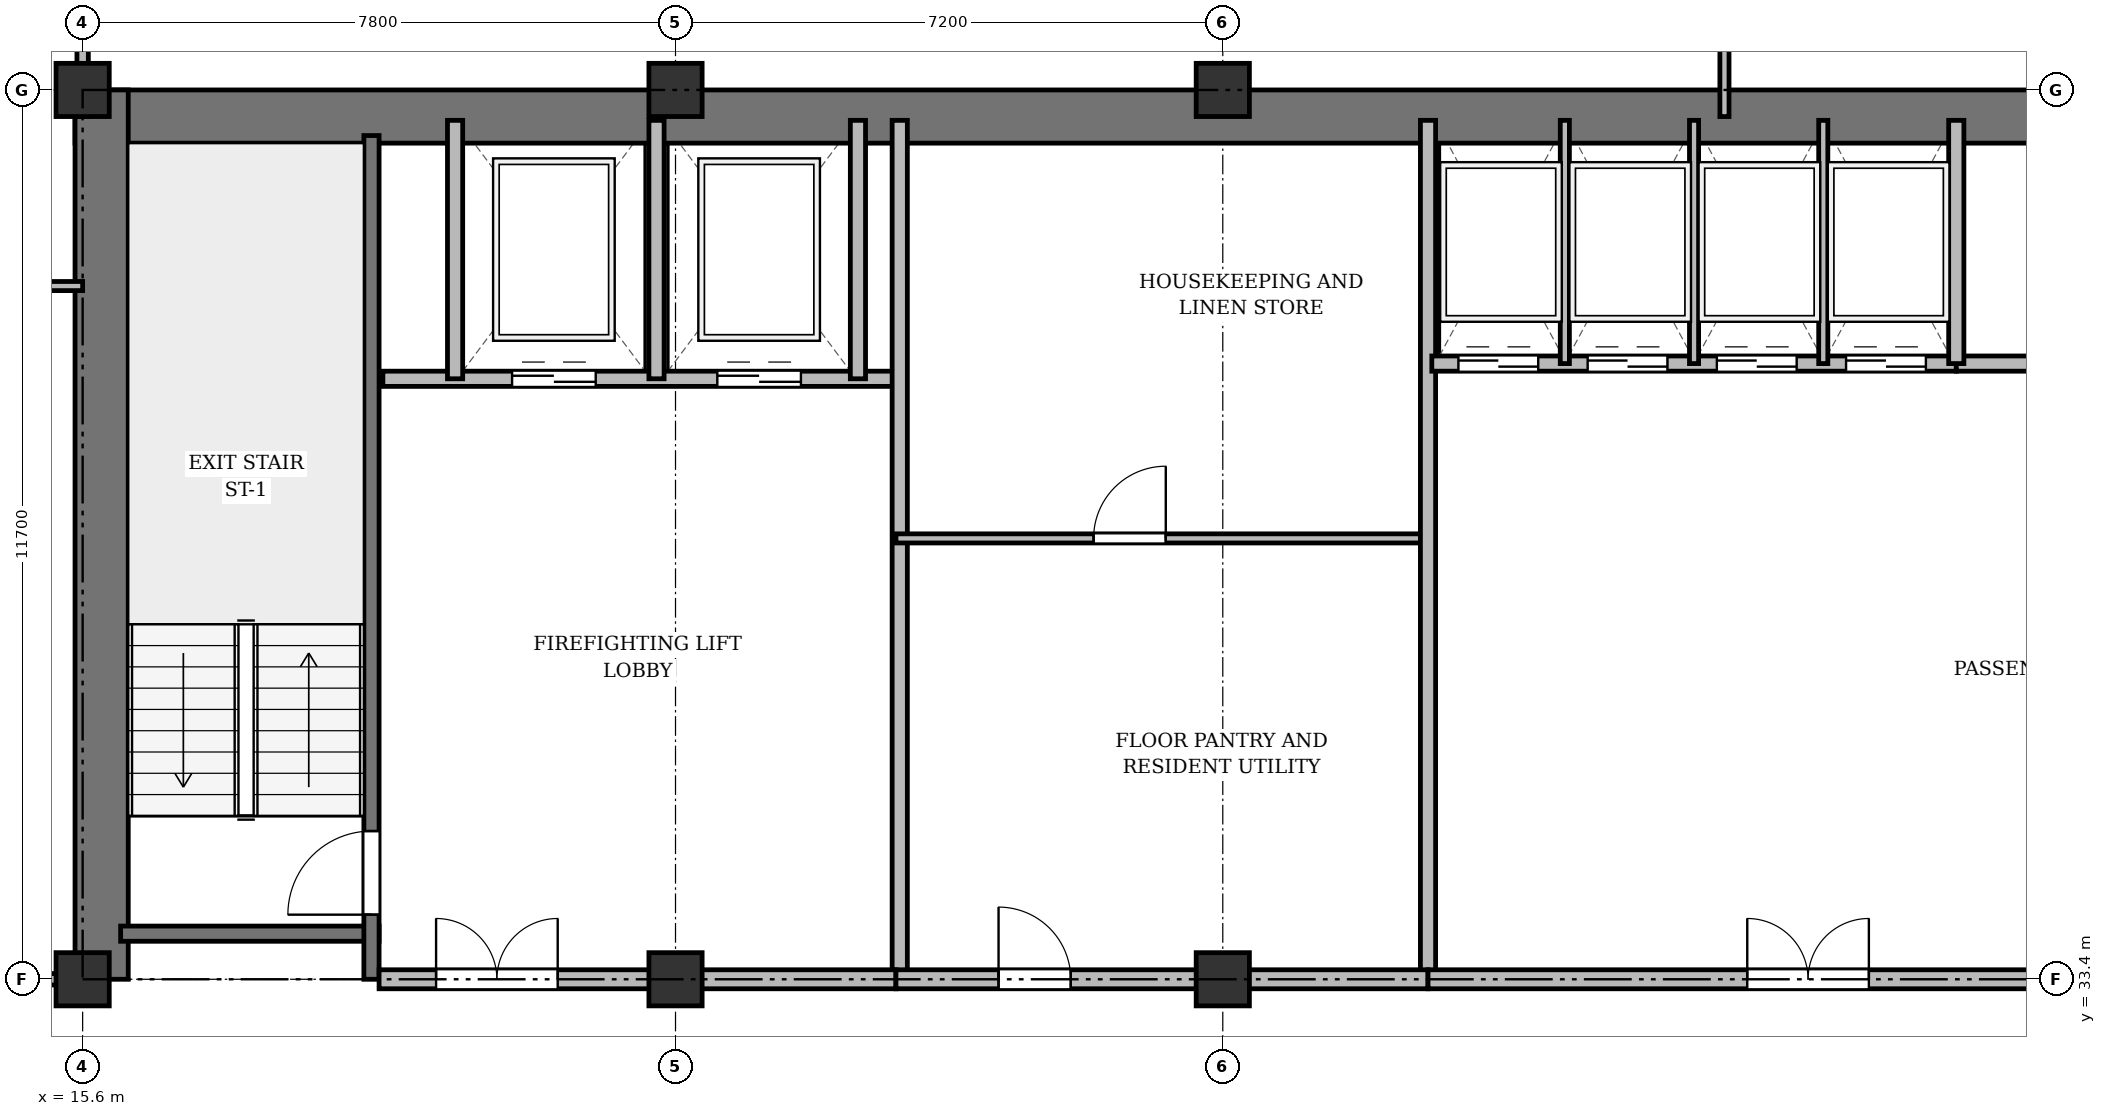
"""IFC4 building model, lengths in metres.
Left out: names, types, materials, properties, quantities, classifications, styles, units other than length and angle.
Written with IfcOpenShell. Run it as: python <this file> out.ifc"""

import sys

from ifc_helpers import new_model, si_unit, direction, frame, frame_2d, origin, origin_2d, place, context, subcontext, project, spatial, rectangle, extrude, source, transform, mapped, element, fill, save


model = new_model("IFC4")
c1 = context("Model", 3, precision=1e-05, world=origin(), true_north=direction((0.0, 1.0)))
c2 = subcontext(c1, "Body", "Model", "MODEL_VIEW")
j1 = project(units=[si_unit("LENGTHUNIT", "METRE"), si_unit("PLANEANGLEUNIT", "RADIAN")], contexts=[c1])
p1 = place(None, origin())
s1 = spatial("IfcSite", under=j1, at=p1, CompositionType="ELEMENT")
p2 = place(p1, origin())
s2 = spatial("IfcBuilding", under=s1, at=p2, CompositionType="ELEMENT")
p3 = place(p2, frame((0.0, 0.0, 135.7)))
s3 = spatial("IfcBuildingStorey", under=s2, at=p3, CompositionType="ELEMENT", Elevation=135.7)
m1 = source(origin(), c2, "Body", "SweptSolid", [
    extrude(rectangle(XDim=0.7, YDim=0.7, at=origin_2d()), origin(), (0.0, 0.0, 1.0), 3.6),
])
for number, where, z_axis, x_axis in (
    (1, (15.6, 33.4, 0.0), (0.0, 0.0, 1.0), (1.0, 0.0, 0.0)),
    (2, (15.6, 45.1, 0.0), (0.0, 0.0, 1.0), (1.0, 0.0, 0.0)),
    (3, (23.4, 33.4, 0.0), (0.0, 0.0, 1.0), (1.0, 0.0, 0.0)),
    (4, (23.4, 45.1, 0.0), (0.0, 0.0, 1.0), (1.0, 0.0, 0.0)),
    (5, (30.6, 33.4, 0.0), (0.0, 0.0, 1.0), (1.0, 0.0, 0.0)),
    (6, (30.6, 45.1, 0.0), (0.0, 0.0, 1.0), (1.0, 0.0, 0.0)),
):
    element("IfcColumn", number, at=place(p3, frame(where, z_axis=z_axis, x_axis=x_axis)), inside=s3, PredefinedType="COLUMN", context=c2, shape_type="MappedRepresentation", body=[
        mapped(m1, transform((0.0, 0.0, 0.0), x_axis=(1.0, 0.0, 0.0), y_axis=(0.0, 1.0, 0.0), z_axis=(0.0, 0.0, 1.0), scale=1.0)),
    ])
p4 = place(p3, frame((15.5, 44.75, 0.0), z_axis=(0.0, 0.0, 1.0), x_axis=(1.0, 0.0, 0.0)))
e7 = element("IfcWall", 7, at=p4, inside=s3, PredefinedType="SHEAR", context=c2, shape_type="SweptSolid", body=[
    extrude(rectangle(XDim=43.4, YDim=0.7, at=frame_2d((21.7, 0.0))), origin(), (0.0, 0.0, 1.0), 3.35),
])
p5 = place(p3, frame((15.85, 33.4, 0.0), z_axis=(0.0, 0.0, 1.0), x_axis=(0.0, 1.0, 0.0)))
e8 = element("IfcWall", 8, at=p5, inside=s3, PredefinedType="SHEAR", context=c2, shape_type="SweptSolid", body=[
    extrude(rectangle(XDim=11.7, YDim=0.7, at=frame_2d((5.85, 0.0))), origin(), (0.0, 0.0, 1.0), 3.35),
])
p6 = place(p3, frame((16.1, 34.0, 0.0), z_axis=(0.0, 0.0, 1.0), x_axis=(1.0, 0.0, 0.0)))
e9 = element("IfcWall", 9, at=p6, inside=s3, PredefinedType="SHEAR", context=c2, shape_type="SweptSolid", body=[
    extrude(rectangle(XDim=3.4, YDim=0.2, at=frame_2d((1.7, 0.0))), origin(), (0.0, 0.0, 1.0), 3.35),
])
p7 = place(p3, frame((19.4, 33.4, 0.0), z_axis=(0.0, 0.0, 1.0), x_axis=(0.0, 1.0, 0.0)))
e10 = element("IfcWall", 10, at=p7, inside=s3, PredefinedType="SHEAR", context=c2, shape_type="SweptSolid", body=[
    extrude(rectangle(XDim=11.1, YDim=0.2, at=frame_2d((5.55, 0.0))), origin(), (0.0, 0.0, 1.0), 3.35),
])
p8 = place(p7, frame((0.85, 0.0, 0.0)))
e11 = element("IfcOpeningElement", 11, at=p8, cuts=e10, PredefinedType="OPENING", context=c2, shape_type="SweptSolid", body=[
    extrude(rectangle(XDim=1.1, YDim=2.15, at=frame_2d((0.55, 1.075))), frame((0.0, 0.11, 0.0), z_axis=(0.0, -1.0, 0.0), x_axis=(1.0, 0.0, 0.0)), (0.0, 0.0, 1.0), 0.22),
])
p9 = place(p3, frame((19.55, 41.3, 0.0), z_axis=(0.0, 0.0, 1.0), x_axis=(1.0, 0.0, 0.0)))
e12 = element("IfcWall", 12, at=p9, inside=s3, PredefinedType="SOLIDWALL", context=c2, shape_type="SweptSolid", body=[
    extrude(rectangle(XDim=6.75, YDim=0.2, at=frame_2d((3.375, 0.0))), origin(), (0.0, 0.0, 1.0), 3.35),
])
p10 = place(p9, frame((1.7, 0.0, 0.0)))
e13 = element("IfcOpeningElement", 13, at=p10, cuts=e12, PredefinedType="OPENING", context=c2, shape_type="SweptSolid", body=[
    extrude(rectangle(XDim=1.1, YDim=2.15, at=frame_2d((0.55, 1.075))), frame((0.0, 0.11, 0.0), z_axis=(0.0, -1.0, 0.0), x_axis=(1.0, 0.0, 0.0)), (0.0, 0.0, 1.0), 0.22),
])
p11 = place(p9, frame((4.4, 0.0, 0.0)))
e14 = element("IfcOpeningElement", 14, at=p11, cuts=e12, PredefinedType="OPENING", context=c2, shape_type="SweptSolid", body=[
    extrude(rectangle(XDim=1.1, YDim=2.15, at=frame_2d((0.55, 1.075))), frame((0.0, 0.11, 0.0), z_axis=(0.0, -1.0, 0.0), x_axis=(1.0, 0.0, 0.0)), (0.0, 0.0, 1.0), 0.22),
])
for number, where, z_axis, x_axis in (
    (15, (20.5, 41.3, 0.0), (0.0, 0.0, 1.0), (0.0, 1.0, 0.0)),
    (16, (23.15, 41.3, 0.0), (0.0, 0.0, 1.0), (0.0, 1.0, 0.0)),
    (17, (25.8, 41.3, 0.0), (0.0, 0.0, 1.0), (0.0, 1.0, 0.0)),
):
    element("IfcWall", number, at=place(p3, frame(where, z_axis=z_axis, x_axis=x_axis)), inside=s3, PredefinedType="SOLIDWALL", context=c2, shape_type="SweptSolid", body=[
        extrude(rectangle(XDim=3.4, YDim=0.2, at=frame_2d((1.7, 0.0))), origin(), (0.0, 0.0, 1.0), 3.35),
    ])
p12 = place(p3, frame((26.35, 33.4, 0.0), z_axis=(0.0, 0.0, 1.0), x_axis=(0.0, 1.0, 0.0)))
e18 = element("IfcWall", 18, at=p12, inside=s3, PredefinedType="SOLIDWALL", context=c2, shape_type="SweptSolid", body=[
    extrude(rectangle(XDim=11.3, YDim=0.2, at=frame_2d((5.65, 0.0))), origin(), (0.0, 0.0, 1.0), 2.75),
])
p13 = place(p3, frame((19.5, 33.4, 0.0), z_axis=(0.0, 0.0, 1.0), x_axis=(1.0, 0.0, 0.0)))
e19 = element("IfcWall", 19, at=p13, inside=s3, PredefinedType="PARTITIONING", context=c2, shape_type="SweptSolid", body=[
    extrude(rectangle(XDim=6.8, YDim=0.25, at=frame_2d((3.4, 0.0))), origin(), (0.0, 0.0, 1.0), 2.75),
])
p14 = place(p13, frame((0.75, 0.0, 0.0)))
e20 = element("IfcOpeningElement", 20, at=p14, cuts=e19, PredefinedType="OPENING", context=c2, shape_type="SweptSolid", body=[
    extrude(rectangle(XDim=1.6, YDim=2.2, at=frame_2d((0.8, 1.1))), frame((0.0, 0.135, 0.0), z_axis=(0.0, -1.0, 0.0), x_axis=(1.0, 0.0, 0.0)), (0.0, 0.0, 1.0), 0.27),
])
p15 = place(p3, frame((26.3, 39.2, 0.0), z_axis=(0.0, 0.0, 1.0), x_axis=(1.0, 0.0, 0.0)))
e21 = element("IfcWall", 21, at=p15, inside=s3, PredefinedType="PARTITIONING", context=c2, shape_type="SweptSolid", body=[
    extrude(rectangle(XDim=7.0, YDim=0.12, at=frame_2d((3.5, 0.0))), origin(), (0.0, 0.0, 1.0), 2.85),
])
p16 = place(p15, frame((2.6, 0.0, 0.0)))
e22 = element("IfcOpeningElement", 22, at=p16, cuts=e21, PredefinedType="OPENING", context=c2, shape_type="SweptSolid", body=[
    extrude(rectangle(XDim=0.95, YDim=2.15, at=frame_2d((0.475, 1.075))), frame((0.0, 0.07, 0.0), z_axis=(0.0, -1.0, 0.0), x_axis=(1.0, 0.0, 0.0)), (0.0, 0.0, 1.0), 0.14),
])
p17 = place(p3, frame((33.3, 33.4, 0.0), z_axis=(0.0, 0.0, 1.0), x_axis=(0.0, 1.0, 0.0)))
e23 = element("IfcWall", 23, at=p17, inside=s3, PredefinedType="SOLIDWALL", context=c2, shape_type="SweptSolid", body=[
    extrude(rectangle(XDim=11.3, YDim=0.2, at=frame_2d((5.65, 0.0))), origin(), (0.0, 0.0, 1.0), 2.75),
])
p18 = place(p3, frame((33.35, 41.5, 0.0), z_axis=(0.0, 0.0, 1.0), x_axis=(1.0, 0.0, 0.0)))
e24 = element("IfcWall", 24, at=p18, inside=s3, PredefinedType="SOLIDWALL", context=c2, shape_type="SweptSolid", body=[
    extrude(rectangle(XDim=6.9, YDim=0.2, at=frame_2d((3.45, 0.0))), origin(), (0.0, 0.0, 1.0), 3.35),
])
p19 = place(p18, frame((0.35, 0.0, 0.0)))
e25 = element("IfcOpeningElement", 25, at=p19, cuts=e24, PredefinedType="OPENING", context=c2, shape_type="SweptSolid", body=[
    extrude(rectangle(XDim=1.05, YDim=2.15, at=frame_2d((0.525, 1.075))), frame((0.0, 0.11, 0.0), z_axis=(0.0, -1.0, 0.0), x_axis=(1.0, 0.0, 0.0)), (0.0, 0.0, 1.0), 0.22),
])
p20 = place(p18, frame((2.05, 0.0, 0.0)))
e26 = element("IfcOpeningElement", 26, at=p20, cuts=e24, PredefinedType="OPENING", context=c2, shape_type="SweptSolid", body=[
    extrude(rectangle(XDim=1.05, YDim=2.15, at=frame_2d((0.525, 1.075))), frame((0.0, 0.11, 0.0), z_axis=(0.0, -1.0, 0.0), x_axis=(1.0, 0.0, 0.0)), (0.0, 0.0, 1.0), 0.22),
])
p21 = place(p18, frame((3.75, 0.0, 0.0)))
e27 = element("IfcOpeningElement", 27, at=p21, cuts=e24, PredefinedType="OPENING", context=c2, shape_type="SweptSolid", body=[
    extrude(rectangle(XDim=1.05, YDim=2.15, at=frame_2d((0.525, 1.075))), frame((0.0, 0.11, 0.0), z_axis=(0.0, -1.0, 0.0), x_axis=(1.0, 0.0, 0.0)), (0.0, 0.0, 1.0), 0.22),
])
p22 = place(p18, frame((5.45, 0.0, 0.0)))
e28 = element("IfcOpeningElement", 28, at=p22, cuts=e24, PredefinedType="OPENING", context=c2, shape_type="SweptSolid", body=[
    extrude(rectangle(XDim=1.05, YDim=2.15, at=frame_2d((0.525, 1.075))), frame((0.0, 0.11, 0.0), z_axis=(0.0, -1.0, 0.0), x_axis=(1.0, 0.0, 0.0)), (0.0, 0.0, 1.0), 0.22),
])
for number, where, z_axis, x_axis in (
    (29, (35.1, 41.5, 0.0), (0.0, 0.0, 1.0), (0.0, 1.0, 0.0)),
    (30, (36.8, 41.5, 0.0), (0.0, 0.0, 1.0), (0.0, 1.0, 0.0)),
    (31, (38.5, 41.5, 0.0), (0.0, 0.0, 1.0), (0.0, 1.0, 0.0)),
):
    element("IfcWall", number, at=place(p3, frame(where, z_axis=z_axis, x_axis=x_axis)), inside=s3, PredefinedType="PARTITIONING", context=c2, shape_type="SweptSolid", body=[
        extrude(rectangle(XDim=3.2, YDim=0.12, at=frame_2d((1.6, 0.0))), origin(), (0.0, 0.0, 1.0), 3.35),
    ])
p23 = place(p3, frame((40.25, 41.5, 0.0), z_axis=(0.0, 0.0, 1.0), x_axis=(1.0, 0.0, 0.0)))
e32 = element("IfcWall", 32, at=p23, inside=s3, PredefinedType="SOLIDWALL", context=c2, shape_type="SweptSolid", body=[
    extrude(rectangle(XDim=6.9, YDim=0.2, at=frame_2d((3.45, 0.0))), origin(), (0.0, 0.0, 1.0), 2.85),
])
p24 = place(p3, frame((40.25, 41.5, 0.0), z_axis=(0.0, 0.0, 1.0), x_axis=(0.0, 1.0, 0.0)))
e33 = element("IfcWall", 33, at=p24, inside=s3, PredefinedType="SOLIDWALL", context=c2, shape_type="SweptSolid", body=[
    extrude(rectangle(XDim=3.2, YDim=0.2, at=frame_2d((1.6, 0.0))), origin(), (0.0, 0.0, 1.0), 3.35),
])
p25 = place(p3, frame((26.3, 33.4, 0.0), z_axis=(0.0, 0.0, 1.0), x_axis=(1.0, 0.0, 0.0)))
e34 = element("IfcWall", 34, at=p25, inside=s3, PredefinedType="PARTITIONING", context=c2, shape_type="SweptSolid", body=[
    extrude(rectangle(XDim=7.0, YDim=0.25, at=frame_2d((3.5, 0.0))), origin(), (0.0, 0.0, 1.0), 2.75),
])
p26 = place(p25, frame((1.35, 0.0, 0.0)))
e35 = element("IfcOpeningElement", 35, at=p26, cuts=e34, PredefinedType="OPENING", context=c2, shape_type="SweptSolid", body=[
    extrude(rectangle(XDim=0.95, YDim=2.15, at=frame_2d((0.475, 1.075))), frame((0.0, 0.135, 0.0), z_axis=(0.0, -1.0, 0.0), x_axis=(1.0, 0.0, 0.0)), (0.0, 0.0, 1.0), 0.27),
])
p27 = place(p3, frame((33.3, 33.4, 0.0), z_axis=(0.0, 0.0, 1.0), x_axis=(1.0, 0.0, 0.0)))
e36 = element("IfcWall", 36, at=p27, inside=s3, PredefinedType="PARTITIONING", context=c2, shape_type="SweptSolid", body=[
    extrude(rectangle(XDim=13.85, YDim=0.25, at=frame_2d((6.925, 0.0))), origin(), (0.0, 0.0, 1.0), 2.75),
])
p28 = place(p27, frame((4.2, 0.0, 0.0)))
e37 = element("IfcOpeningElement", 37, at=p28, cuts=e36, PredefinedType="OPENING", context=c2, shape_type="SweptSolid", body=[
    extrude(rectangle(XDim=1.6, YDim=2.2, at=frame_2d((0.8, 1.1))), frame((0.0, 0.135, 0.0), z_axis=(0.0, -1.0, 0.0), x_axis=(1.0, 0.0, 0.0)), (0.0, 0.0, 1.0), 0.27),
])
p29 = place(p3, frame((11.825, 42.52, 0.0), z_axis=(0.0, 0.0, 1.0), x_axis=(1.0, 0.0, 0.0)))
e38 = element("IfcWall", 38, at=p29, inside=s3, PredefinedType="PARTITIONING", context=c2, shape_type="SweptSolid", body=[
    extrude(rectangle(XDim=3.775, YDim=0.12, at=frame_2d((1.888, 0.0))), origin(), (0.0, 0.0, 1.0), 2.85),
])
p30 = place(p29, frame((1.319, 0.0, 0.0)))
e39 = element("IfcOpeningElement", 39, at=p30, cuts=e38, PredefinedType="OPENING", context=c2, shape_type="SweptSolid", body=[
    extrude(rectangle(XDim=0.95, YDim=2.15, at=frame_2d((0.475, 1.075))), frame((0.0, 0.07, 0.0), z_axis=(0.0, -1.0, 0.0), x_axis=(1.0, 0.0, 0.0)), (0.0, 0.0, 1.0), 0.14),
])
p31 = place(p3, frame((8.05, 33.4, 0.0), z_axis=(0.0, 0.0, 1.0), x_axis=(1.0, 0.0, 0.0)))
e40 = element("IfcWall", 40, at=p31, inside=s3, PredefinedType="PARTITIONING", context=c2, shape_type="SweptSolid", body=[
    extrude(rectangle(XDim=7.55, YDim=0.15, at=frame_2d((3.775, 0.0))), origin(), (0.0, 0.0, 1.0), 2.75),
])
p32 = place(p31, frame((4.375, 0.0, 0.0)))
e41 = element("IfcOpeningElement", 41, at=p32, cuts=e40, PredefinedType="OPENING", context=c2, shape_type="SweptSolid", body=[
    extrude(rectangle(XDim=0.95, YDim=2.15, at=frame_2d((0.475, 1.075))), frame((0.0, 0.085, 0.0), z_axis=(0.0, -1.0, 0.0), x_axis=(1.0, 0.0, 0.0)), (0.0, 0.0, 1.0), 0.17),
])
p33 = place(p3, frame((37.2, 44.75, 0.0), z_axis=(0.0, 0.0, 1.0), x_axis=(0.0, 1.0, 0.0)))
e42 = element("IfcWall", 42, at=p33, inside=s3, PredefinedType="PARTITIONING", context=c2, shape_type="SweptSolid", body=[
    extrude(rectangle(XDim=3.61, YDim=0.12, at=frame_2d((1.805, 0.0))), origin(), (0.0, 0.0, 1.0), 2.75),
])
p34 = place(p33, frame((1.1, 0.0, 0.0)))
e43 = element("IfcOpeningElement", 43, at=p34, cuts=e42, PredefinedType="OPENING", context=c2, shape_type="SweptSolid", body=[
    extrude(rectangle(XDim=0.95, YDim=2.15, at=frame_2d((0.475, 1.075))), frame((0.0, 0.07, 0.0), z_axis=(0.0, -1.0, 0.0), x_axis=(1.0, 0.0, 0.0)), (0.0, 0.0, 1.0), 0.14),
])
p35 = place(p3, frame((15.6, 44.75, 0.0), z_axis=(0.0, 0.0, 1.0), x_axis=(0.0, 1.0, 0.0)))
e44 = element("IfcWall", 44, at=p35, inside=s3, PredefinedType="PARTITIONING", context=c2, shape_type="SweptSolid", body=[
    extrude(rectangle(XDim=3.61, YDim=0.15, at=frame_2d((1.805, 0.0))), origin(), (0.0, 0.0, 1.0), 2.85),
])
p36 = place(p35, frame((1.1, 0.0, 0.0)))
e45 = element("IfcOpeningElement", 45, at=p36, cuts=e44, PredefinedType="OPENING", context=c2, shape_type="SweptSolid", body=[
    extrude(rectangle(XDim=0.95, YDim=2.15, at=frame_2d((0.475, 1.075))), frame((0.0, 0.085, 0.0), z_axis=(0.0, -1.0, 0.0), x_axis=(1.0, 0.0, 0.0)), (0.0, 0.0, 1.0), 0.17),
])
m2 = source(origin(), c2, "Body", "SweptSolid", [
    extrude(rectangle(XDim=1.1, YDim=2.15, at=frame_2d((0.55, 1.075))), frame((0.0, 0.025, 0.0), z_axis=(0.0, -1.0, 0.0), x_axis=(1.0, 0.0, 0.0)), (0.0, 0.0, 1.0), 0.05),
])
p37 = place(p8, origin())
e46 = element("IfcDoor", 46, at=p37, inside=s3, OperationType="SINGLE_SWING_LEFT", PredefinedType="DOOR", context=c2, shape_type="MappedRepresentation", body=[
    mapped(m2, transform((0.0, 0.0, 0.0), x_axis=(1.0, 0.0, 0.0), y_axis=(0.0, 1.0, 0.0), z_axis=(0.0, 0.0, 1.0), scale=1.0)),
])
fill(e11, e46)
p38 = place(p10, origin())
e47 = element("IfcDoor", 47, at=p38, inside=s3, OperationType="DOUBLE_DOOR_SLIDING", PredefinedType="DOOR", context=c2, shape_type="MappedRepresentation", body=[
    mapped(m2, transform((0.0, 0.0, 0.0), x_axis=(1.0, 0.0, 0.0), y_axis=(0.0, 1.0, 0.0), z_axis=(0.0, 0.0, 1.0), scale=1.0)),
])
fill(e13, e47)
p39 = place(p11, origin())
e48 = element("IfcDoor", 48, at=p39, inside=s3, OperationType="DOUBLE_DOOR_SLIDING", PredefinedType="DOOR", context=c2, shape_type="MappedRepresentation", body=[
    mapped(m2, transform((0.0, 0.0, 0.0), x_axis=(1.0, 0.0, 0.0), y_axis=(0.0, 1.0, 0.0), z_axis=(0.0, 0.0, 1.0), scale=1.0)),
])
fill(e14, e48)
m3 = source(origin(), c2, "Body", "SweptSolid", [
    extrude(rectangle(XDim=1.6, YDim=2.2, at=frame_2d((0.8, 1.1))), frame((0.0, 0.025, 0.0), z_axis=(0.0, -1.0, 0.0), x_axis=(1.0, 0.0, 0.0)), (0.0, 0.0, 1.0), 0.05),
])
p40 = place(p14, origin())
e49 = element("IfcDoor", 49, at=p40, inside=s3, OperationType="DOUBLE_DOOR_SINGLE_SWING", PredefinedType="DOOR", context=c2, shape_type="MappedRepresentation", body=[
    mapped(m3, transform((0.0, 0.0, 0.0), x_axis=(1.0, 0.0, 0.0), y_axis=(0.0, 1.0, 0.0), z_axis=(0.0, 0.0, 1.0), scale=1.0)),
])
fill(e20, e49)
m4 = source(origin(), c2, "Body", "SweptSolid", [
    extrude(rectangle(XDim=0.95, YDim=2.15, at=frame_2d((0.475, 1.075))), frame((0.0, 0.025, 0.0), z_axis=(0.0, -1.0, 0.0), x_axis=(1.0, 0.0, 0.0)), (0.0, 0.0, 1.0), 0.05),
])
p41 = place(p16, origin())
e50 = element("IfcDoor", 50, at=p41, inside=s3, OperationType="SINGLE_SWING_RIGHT", PredefinedType="DOOR", context=c2, shape_type="MappedRepresentation", body=[
    mapped(m4, transform((0.0, 0.0, 0.0), x_axis=(1.0, 0.0, 0.0), y_axis=(0.0, 1.0, 0.0), z_axis=(0.0, 0.0, 1.0), scale=1.0)),
])
fill(e22, e50)
m5 = source(origin(), c2, "Body", "SweptSolid", [
    extrude(rectangle(XDim=1.05, YDim=2.15, at=frame_2d((0.525, 1.075))), frame((0.0, 0.025, 0.0), z_axis=(0.0, -1.0, 0.0), x_axis=(1.0, 0.0, 0.0)), (0.0, 0.0, 1.0), 0.05),
])
p42 = place(p19, origin())
e51 = element("IfcDoor", 51, at=p42, inside=s3, OperationType="DOUBLE_DOOR_SLIDING", PredefinedType="DOOR", context=c2, shape_type="MappedRepresentation", body=[
    mapped(m5, transform((0.0, 0.0, 0.0), x_axis=(1.0, 0.0, 0.0), y_axis=(0.0, 1.0, 0.0), z_axis=(0.0, 0.0, 1.0), scale=1.0)),
])
fill(e25, e51)
p43 = place(p20, origin())
e52 = element("IfcDoor", 52, at=p43, inside=s3, OperationType="DOUBLE_DOOR_SLIDING", PredefinedType="DOOR", context=c2, shape_type="MappedRepresentation", body=[
    mapped(m5, transform((0.0, 0.0, 0.0), x_axis=(1.0, 0.0, 0.0), y_axis=(0.0, 1.0, 0.0), z_axis=(0.0, 0.0, 1.0), scale=1.0)),
])
fill(e26, e52)
p44 = place(p21, origin())
e53 = element("IfcDoor", 53, at=p44, inside=s3, OperationType="DOUBLE_DOOR_SLIDING", PredefinedType="DOOR", context=c2, shape_type="MappedRepresentation", body=[
    mapped(m5, transform((0.0, 0.0, 0.0), x_axis=(1.0, 0.0, 0.0), y_axis=(0.0, 1.0, 0.0), z_axis=(0.0, 0.0, 1.0), scale=1.0)),
])
fill(e27, e53)
p45 = place(p22, origin())
e54 = element("IfcDoor", 54, at=p45, inside=s3, OperationType="DOUBLE_DOOR_SLIDING", PredefinedType="DOOR", context=c2, shape_type="MappedRepresentation", body=[
    mapped(m5, transform((0.0, 0.0, 0.0), x_axis=(1.0, 0.0, 0.0), y_axis=(0.0, 1.0, 0.0), z_axis=(0.0, 0.0, 1.0), scale=1.0)),
])
fill(e28, e54)
p46 = place(p26, origin())
e55 = element("IfcDoor", 55, at=p46, inside=s3, OperationType="SINGLE_SWING_LEFT", PredefinedType="DOOR", context=c2, shape_type="MappedRepresentation", body=[
    mapped(m4, transform((0.0, 0.0, 0.0), x_axis=(1.0, 0.0, 0.0), y_axis=(0.0, 1.0, 0.0), z_axis=(0.0, 0.0, 1.0), scale=1.0)),
])
fill(e35, e55)
p47 = place(p28, origin())
e56 = element("IfcDoor", 56, at=p47, inside=s3, OperationType="DOUBLE_DOOR_SINGLE_SWING", PredefinedType="DOOR", context=c2, shape_type="MappedRepresentation", body=[
    mapped(m3, transform((0.0, 0.0, 0.0), x_axis=(1.0, 0.0, 0.0), y_axis=(0.0, 1.0, 0.0), z_axis=(0.0, 0.0, 1.0), scale=1.0)),
])
fill(e37, e56)
save(model, sys.argv[1])
